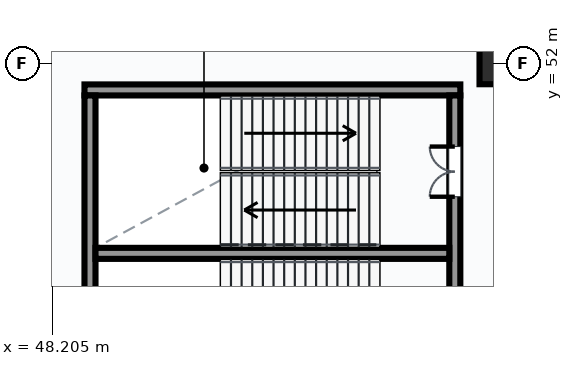
"""IFC4 building model, lengths in metres.
Left out: names, types, materials, properties, quantities, classifications, styles, units other than length and angle.
Written with IfcOpenShell. Run it as: python <this file> out.ifc"""

import sys

from ifc_helpers import new_model, si_unit, direction, frame, frame_2d, origin, origin_2d, place, context, subcontext, project, spatial, rectangle, extrude, element, fill, save


model = new_model("IFC4")
c1 = context("Model", 3, precision=1e-05, world=origin(), true_north=direction((0.0, 1.0)))
c2 = subcontext(c1, "Body", "Model", "MODEL_VIEW")
j1 = project(units=[si_unit("LENGTHUNIT", "METRE"), si_unit("PLANEANGLEUNIT", "RADIAN")], contexts=[c1])
p1 = place(None, origin())
s1 = spatial("IfcSite", under=j1, at=p1, CompositionType="ELEMENT")
p2 = place(p1, origin())
s2 = spatial("IfcBuilding", under=s1, at=p2, CompositionType="ELEMENT")
p3 = place(p2, frame((0.0, 0.0, 5.4)))
s3 = spatial("IfcBuildingStorey", under=s2, at=p3, CompositionType="ELEMENT", Elevation=5.4)
p4 = place(p3, frame((60.0, 52.0, 0.0), z_axis=(0.0, 0.0, 1.0), x_axis=(1.0, 0.0, 0.0)))
e1 = element("IfcColumn", 1, at=p4, inside=s3, PredefinedType="COLUMN", context=c2, shape_type="SweptSolid", body=[
    extrude(rectangle(XDim=1.1, YDim=1.1, at=origin_2d()), origin(), (0.0, 0.0, 1.0), 4.8),
])
p5 = place(p3, frame((49.055, 51.3, 0.0), z_axis=(0.0, 0.0, 1.0), x_axis=(1.0, 0.0, 0.0)))
e2 = element("IfcWall", 2, at=p5, inside=s3, PredefinedType="SHEAR", context=c2, shape_type="SweptSolid", body=[
    extrude(rectangle(XDim=9.89, YDim=0.29, at=frame_2d((4.945, 0.0))), origin(), (0.0, 0.0, 1.0), 4.8),
])
p6 = place(p3, frame((49.2, 42.845, 0.0), z_axis=(0.0, 0.0, 1.0), x_axis=(0.0, 1.0, 0.0)))
e3 = element("IfcWall", 3, at=p6, inside=s3, PredefinedType="SHEAR", context=c2, shape_type="SweptSolid", body=[
    extrude(rectangle(XDim=8.31, YDim=0.29, at=frame_2d((4.155, 0.0))), origin(), (0.0, 0.0, 1.0), 4.8),
])
p7 = place(p3, frame((58.8, 42.845, 0.0), z_axis=(0.0, 0.0, 1.0), x_axis=(0.0, 1.0, 0.0)))
e4 = element("IfcWall", 4, at=p7, inside=s3, PredefinedType="SHEAR", context=c2, shape_type="SweptSolid", body=[
    extrude(rectangle(XDim=8.31, YDim=0.29, at=frame_2d((4.155, 0.0))), origin(), (0.0, 0.0, 1.0), 4.8),
])
p8 = place(p7, frame((1.305, 0.0, 0.0)))
e5 = element("IfcOpeningElement", 5, at=p8, cuts=e4, PredefinedType="OPENING", context=c2, shape_type="SweptSolid", body=[
    extrude(rectangle(XDim=1.4, YDim=2.2, at=frame_2d((0.7, 1.1))), frame((0.0, 0.155, 0.0), z_axis=(0.0, -1.0, 0.0), x_axis=(1.0, 0.0, 0.0)), (0.0, 0.0, 1.0), 0.31),
])
p9 = place(p7, frame((5.645, 0.0, 0.0)))
e6 = element("IfcOpeningElement", 6, at=p9, cuts=e4, PredefinedType="OPENING", context=c2, shape_type="SweptSolid", body=[
    extrude(rectangle(XDim=1.32, YDim=2.2, at=frame_2d((0.66, 1.1))), frame((0.0, 0.155, 0.0), z_axis=(0.0, -1.0, 0.0), x_axis=(1.0, 0.0, 0.0)), (0.0, 0.0, 1.0), 0.31),
])
p10 = place(p3, frame((49.345, 47.0, 0.0), z_axis=(0.0, 0.0, 1.0), x_axis=(1.0, 0.0, 0.0)))
e7 = element("IfcWall", 7, at=p10, inside=s3, PredefinedType="SHEAR", context=c2, shape_type="SweptSolid", body=[
    extrude(rectangle(XDim=9.31, YDim=0.29, at=frame_2d((4.655, 0.0))), origin(), (0.0, 0.0, 1.0), 4.8),
])
p11 = place(p9, origin())
e8 = element("IfcDoor", 8, at=p11, inside=s3, OperationType="DOUBLE_DOOR_SINGLE_SWING", PredefinedType="DOOR", context=c2, shape_type="SweptSolid", body=[
    extrude(rectangle(XDim=1.32, YDim=2.2, at=frame_2d((0.66, 1.1))), frame((0.0, 0.025, 0.0), z_axis=(0.0, -1.0, 0.0), x_axis=(1.0, 0.0, 0.0)), (0.0, 0.0, 1.0), 0.05),
])
fill(e6, e8)
save(model, sys.argv[1])
